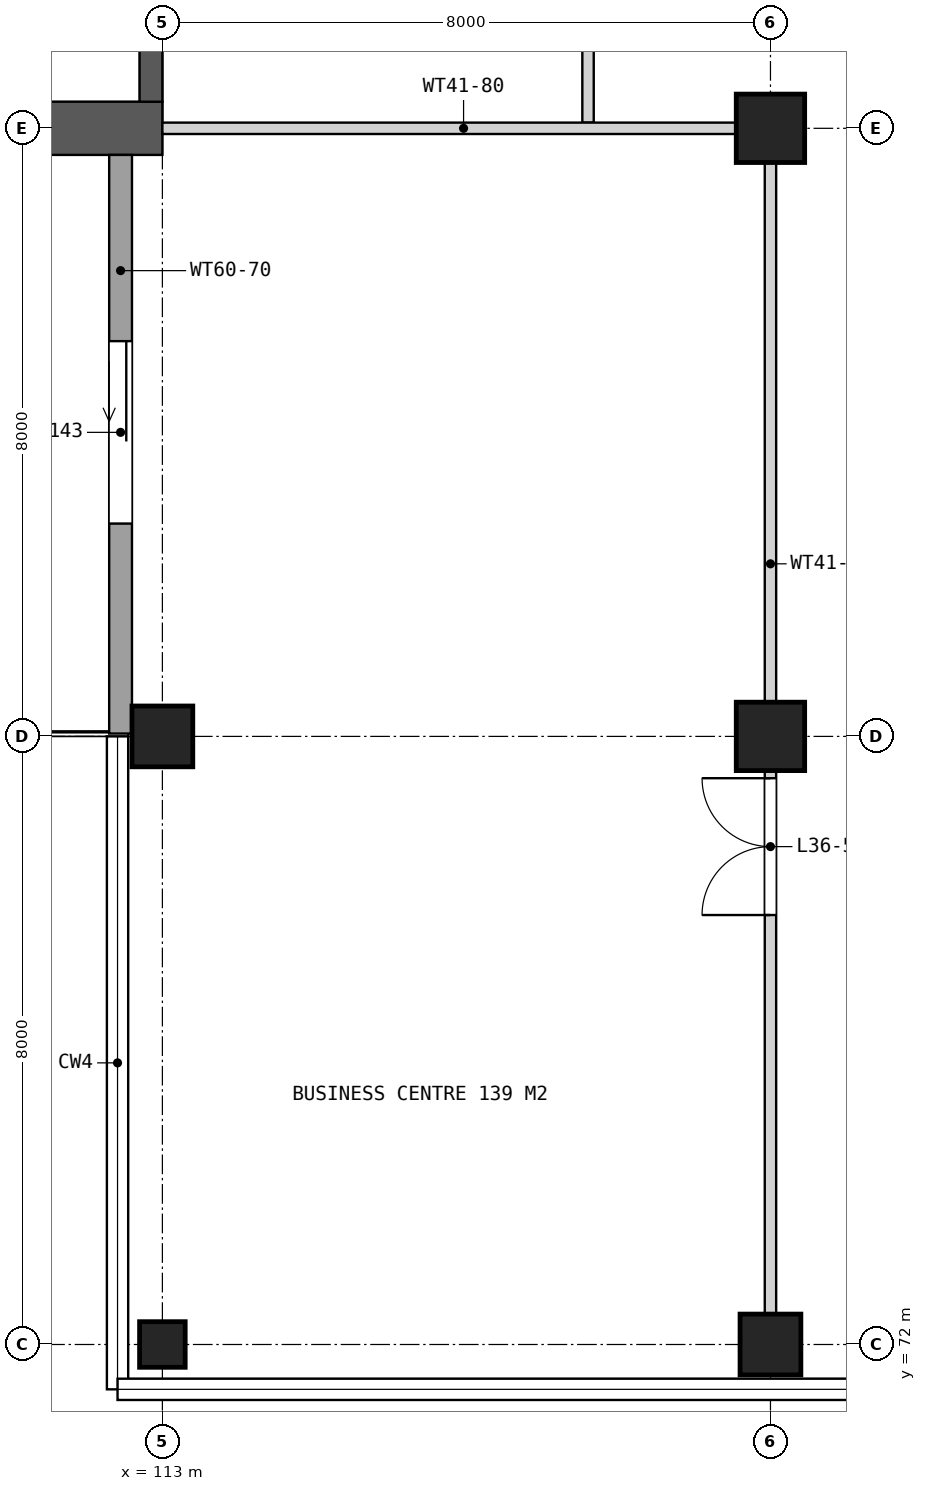
"""IFC4 building model, lengths in metres.
Left out: names, types, materials, properties, quantities, classifications, styles, units other than length and angle.
Written with IfcOpenShell. Run it as: python <this file> out.ifc"""

import sys

from ifc_helpers import new_model, si_unit, direction, frame, frame_2d, origin, origin_2d, place, context, subcontext, project, spatial, rectangle, extrude, element, fill, save


model = new_model("IFC4")
c1 = context("Model", 3, precision=1e-05, world=origin(), true_north=direction((0.0, 1.0)))
c2 = subcontext(c1, "Body", "Model", "MODEL_VIEW")
j1 = project(units=[si_unit("LENGTHUNIT", "METRE"), si_unit("PLANEANGLEUNIT", "RADIAN")], contexts=[c1])
p1 = place(None, origin())
s1 = spatial("IfcSite", under=j1, at=p1, CompositionType="ELEMENT")
p2 = place(p1, origin())
s2 = spatial("IfcBuilding", under=s1, at=p2, CompositionType="ELEMENT")
p3 = place(p2, frame((0.0, 0.0, 171.5)))
s3 = spatial("IfcBuildingStorey", under=s2, at=p3, CompositionType="ELEMENT", Elevation=171.5)
p4 = place(p3, frame((113.0, 72.0, 0.0), z_axis=(0.0, 0.0, 1.0), x_axis=(1.0, 0.0, 0.0)))
e1 = element("IfcColumn", 1, at=p4, inside=s3, PredefinedType="COLUMN", context=c2, shape_type="SweptSolid", body=[
    extrude(rectangle(XDim=0.6, YDim=0.6, at=origin_2d()), origin(), (0.0, 0.0, 1.0), 7.4),
])
for number, where, z_axis, x_axis in (
    (2, (113.0, 80.0, 0.0), (0.0, 0.0, 1.0), (1.0, 0.0, 0.0)),
    (3, (121.0, 72.0, 0.0), (0.0, 0.0, 1.0), (1.0, 0.0, 0.0)),
):
    element("IfcColumn", number, at=place(p3, frame(where, z_axis=z_axis, x_axis=x_axis)), inside=s3, PredefinedType="COLUMN", context=c2, shape_type="SweptSolid", body=[
        extrude(rectangle(XDim=0.8, YDim=0.8, at=origin_2d()), origin(), (0.0, 0.0, 1.0), 7.4),
    ])
for number, where, z_axis, x_axis in (
    (4, (121.0, 80.0, 0.0), (0.0, 0.0, 1.0), (1.0, 0.0, 0.0)),
    (5, (121.0, 88.0, 0.0), (0.0, 0.0, 1.0), (1.0, 0.0, 0.0)),
):
    element("IfcColumn", number, at=place(p3, frame(where, z_axis=z_axis, x_axis=x_axis)), inside=s3, PredefinedType="COLUMN", context=c2, shape_type="SweptSolid", body=[
        extrude(rectangle(XDim=0.9, YDim=0.9, at=origin_2d()), origin(), (0.0, 0.0, 1.0), 7.4),
    ])
p5 = place(p3, frame((113.0, 88.0, 0.0), z_axis=(0.0, 0.0, 1.0), x_axis=(-1.0, 0.0, 0.0)))
e6 = element("IfcWall", 6, at=p5, inside=s3, PredefinedType="SHEAR", context=c2, shape_type="SweptSolid", body=[
    extrude(rectangle(XDim=7.1, YDim=0.7, at=frame_2d((3.55, 0.0))), origin(), (0.0, 0.0, 1.0), 7.4),
])
p6 = place(p3, frame((112.85, 94.3, 0.0), z_axis=(0.0, 0.0, 1.0), x_axis=(0.0, -1.0, 0.0)))
e7 = element("IfcWall", 7, at=p6, inside=s3, PredefinedType="SHEAR", context=c2, shape_type="SweptSolid", body=[
    extrude(rectangle(XDim=5.95, YDim=0.3, at=frame_2d((2.975, 0.0))), origin(), (0.0, 0.0, 1.0), 7.4),
])
p7 = place(p3, frame((112.45, 87.65, 0.0), z_axis=(0.0, 0.0, 1.0), x_axis=(0.0, -1.0, 0.0)))
e8 = element("IfcWall", 8, at=p7, inside=s3, PredefinedType="SOLIDWALL", context=c2, shape_type="SweptSolid", body=[
    extrude(rectangle(XDim=7.612, YDim=0.3, at=frame_2d((3.806, 0.0))), origin(), (0.0, 0.0, 1.0), 7.1),
])
p8 = place(p7, frame((2.45, 0.0, 0.0)))
e9 = element("IfcOpeningElement", 9, at=p8, cuts=e8, PredefinedType="OPENING", context=c2, shape_type="SweptSolid", body=[
    extrude(rectangle(XDim=2.4, YDim=2.4, at=frame_2d((1.2, 1.2))), frame((0.0, 0.16, 0.0), z_axis=(0.0, -1.0, 0.0), x_axis=(1.0, 0.0, 0.0)), (0.0, 0.0, 1.0), 0.32),
])
p9 = place(p3, frame((118.6, 88.075, 0.0), z_axis=(0.0, 0.0, 1.0), x_axis=(0.0, 1.0, 0.0)))
e10 = element("IfcWall", 10, at=p9, inside=s3, PredefinedType="PARTITIONING", context=c2, shape_type="SweptSolid", body=[
    extrude(rectangle(XDim=5.925, YDim=0.15, at=frame_2d((2.962, 0.0))), origin(), (0.0, 0.0, 1.0), 6.64),
])
p10 = place(p9, frame((2.45, 0.0, 0.0)))
e11 = element("IfcOpeningElement", 11, at=p10, cuts=e10, PredefinedType="OPENING", context=c2, shape_type="SweptSolid", body=[
    extrude(rectangle(XDim=1.0, YDim=2.1, at=frame_2d((0.5, 1.05))), frame((0.0, 0.085, 0.0), z_axis=(0.0, -1.0, 0.0), x_axis=(1.0, 0.0, 0.0)), (0.0, 0.0, 1.0), 0.17),
])
p11 = place(p3, frame((121.0, 71.63, 0.0), z_axis=(0.0, 0.0, 1.0), x_axis=(0.0, 1.0, 0.0)))
e12 = element("IfcWall", 12, at=p11, inside=s3, PredefinedType="PARTITIONING", context=c2, shape_type="SweptSolid", body=[
    extrude(rectangle(XDim=16.37, YDim=0.15, at=frame_2d((8.185, 0.0))), origin(), (0.0, 0.0, 1.0), 6.64),
])
p12 = place(p11, frame((6.02, 0.0, 0.0)))
e13 = element("IfcOpeningElement", 13, at=p12, cuts=e12, PredefinedType="OPENING", context=c2, shape_type="SweptSolid", body=[
    extrude(rectangle(XDim=1.8, YDim=2.1, at=frame_2d((0.9, 1.05))), frame((0.0, 0.085, 0.0), z_axis=(0.0, -1.0, 0.0), x_axis=(1.0, 0.0, 0.0)), (0.0, 0.0, 1.0), 0.17),
])
p13 = place(p3, frame((113.0, 88.0, 0.0), z_axis=(0.0, 0.0, 1.0), x_axis=(1.0, 0.0, 0.0)))
e14 = element("IfcWall", 14, at=p13, inside=s3, PredefinedType="PARTITIONING", context=c2, shape_type="SweptSolid", body=[
    extrude(rectangle(XDim=7.925, YDim=0.15, at=frame_2d((3.962, 0.0))), origin(), (0.0, 0.0, 1.0), 6.64),
])
p14 = place(p8, frame((2.4, 0.0, 0.0), z_axis=(0.0, 0.0, 1.0), x_axis=(-1.0, 0.0, 0.0)))
e15 = element("IfcDoor", 15, at=p14, inside=s3, OperationType="SLIDING_TO_LEFT", PredefinedType="DOOR", context=c2, shape_type="SweptSolid", body=[
    extrude(rectangle(XDim=2.4, YDim=2.4, at=frame_2d((1.2, 1.2))), frame((0.0, 0.025, 0.0), z_axis=(0.0, -1.0, 0.0), x_axis=(1.0, 0.0, 0.0)), (0.0, 0.0, 1.0), 0.05),
])
fill(e9, e15)
p15 = place(p12, origin())
e16 = element("IfcDoor", 16, at=p15, inside=s3, OperationType="DOUBLE_DOOR_SINGLE_SWING", PredefinedType="DOOR", context=c2, shape_type="SweptSolid", body=[
    extrude(rectangle(XDim=1.8, YDim=2.1, at=frame_2d((0.9, 1.05))), frame((0.0, 0.025, 0.0), z_axis=(0.0, -1.0, 0.0), x_axis=(1.0, 0.0, 0.0)), (0.0, 0.0, 1.0), 0.05),
])
fill(e13, e16)
save(model, sys.argv[1])
